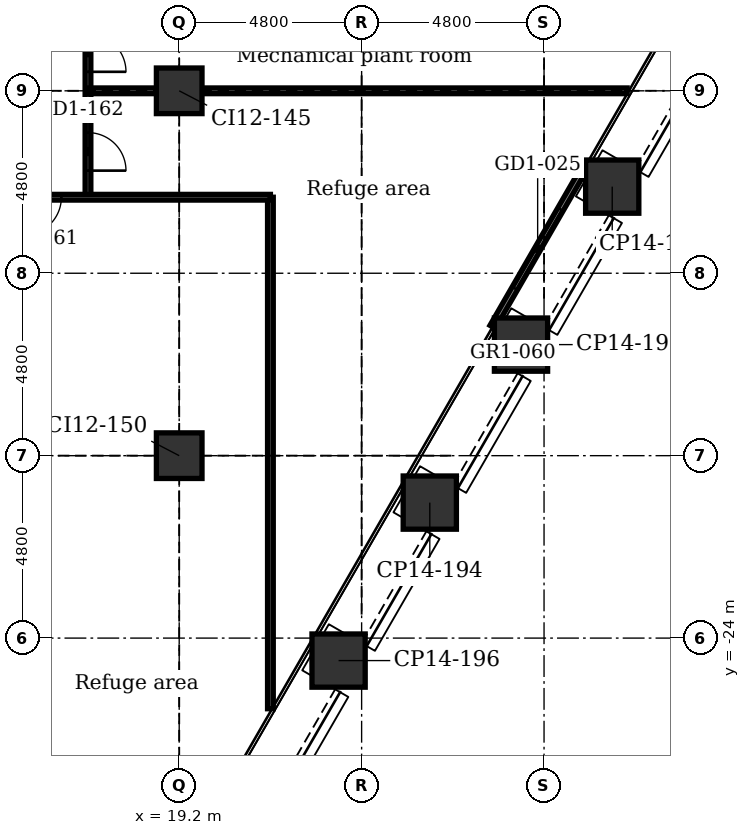
"""IFC4 building model, lengths in metres.
Left out: names, types, materials, properties, quantities, classifications, styles, units other than length and angle.
Written with IfcOpenShell. Run it as: python <this file> out.ifc"""

import sys

from ifc_helpers import new_model, si_unit, direction, frame, frame_2d, origin, origin_2d, place, context, subcontext, project, spatial, rectangle, extrude, element, fill, save


model = new_model("IFC4")
c1 = context("Model", 3, precision=1e-05, world=origin(), true_north=direction((0.0, 1.0)))
c2 = subcontext(c1, "Body", "Model", "MODEL_VIEW")
j1 = project(units=[si_unit("LENGTHUNIT", "METRE"), si_unit("PLANEANGLEUNIT", "RADIAN")], contexts=[c1])
p1 = place(None, origin())
s1 = spatial("IfcSite", under=j1, at=p1, CompositionType="ELEMENT")
p2 = place(p1, origin())
s2 = spatial("IfcBuilding", under=s1, at=p2, CompositionType="ELEMENT")
p3 = place(p2, frame((0.0, 0.0, 66.4)))
s3 = spatial("IfcBuildingStorey", under=s2, at=p3, CompositionType="ELEMENT", Elevation=66.4)
for number, where, z_axis, x_axis in (
    (1, (32.994, -7.964, -0.3), (0.0, 0.0, 1.0), (0.5, 0.866, 0.0)),
    (2, (30.594, -12.121, -0.3), (0.0, 0.0, 1.0), (0.5, 0.866, 0.0)),
    (3, (28.194, -16.278, -0.3), (0.0, 0.0, 1.0), (0.5, 0.866, 0.0)),
    (4, (25.794, -20.435, -0.3), (0.0, 0.0, 1.0), (0.5, 0.866, 0.0)),
    (5, (23.394, -24.592, -0.3), (0.0, 0.0, 1.0), (0.5, 0.866, 0.0)),
):
    element("IfcColumn", number, at=place(p3, frame(where, z_axis=z_axis, x_axis=x_axis)), inside=s3, PredefinedType="COLUMN", context=c2, shape_type="SweptSolid", body=[
        extrude(rectangle(XDim=1.4, YDim=1.4, at=origin_2d()), origin(), (0.0, 0.0, 1.0), 5.5),
    ])
for number, where, z_axis, x_axis in (
    (6, (19.2, -19.2, -0.3), (0.0, 0.0, 1.0), (1.0, 0.0, 0.0)),
    (7, (19.2, -9.6, -0.3), (0.0, 0.0, 1.0), (1.0, 0.0, 0.0)),
):
    element("IfcColumn", number, at=place(p3, frame(where, z_axis=z_axis, x_axis=x_axis)), inside=s3, PredefinedType="COLUMN", context=c2, shape_type="SweptSolid", body=[
        extrude(rectangle(XDim=1.2, YDim=1.2, at=origin_2d()), origin(), (0.0, 0.0, 1.0), 5.5),
    ])
p4 = place(p3, frame((29.817, -11.707, 0.0), z_axis=(0.0, 0.0, 1.0), x_axis=(-0.499978080042, -0.866038058908, 0.0)))
e8 = element("IfcWall", 8, at=p4, inside=s3, PredefinedType="PARTITIONING", context=c2, shape_type="SweptSolid", body=[
    extrude(rectangle(XDim=4.74, YDim=0.16, at=frame_2d((2.37, 0.0))), origin(), (0.0, 0.0, 1.0), 5.2),
])
p5 = place(p4, frame((1.17, 0.0, 0.0)))
e9 = element("IfcOpeningElement", 9, at=p5, cuts=e8, PredefinedType="OPENING", context=c2, shape_type="SweptSolid", body=[
    extrude(rectangle(XDim=2.4, YDim=2.4, at=frame_2d((1.2, 1.2))), frame((0.0, 0.09, 0.0), z_axis=(0.0, -1.0, 0.0), x_axis=(1.0, 0.0, 0.0)), (0.0, 0.0, 1.0), 0.18),
])
p6 = place(p3, frame((21.6, -25.858, 0.0), z_axis=(0.0, 0.0, 1.0), x_axis=(0.0, 1.0, 0.0)))
e10 = element("IfcWall", 10, at=p6, inside=s3, PredefinedType="PARTITIONING", context=c2, shape_type="SweptSolid", body=[
    extrude(rectangle(XDim=13.458, YDim=0.15, at=frame_2d((6.729, 0.0))), origin(), (0.0, 0.0, 1.0), 5.2),
])
p7 = place(p3, frame((16.8, -12.4, 0.0), z_axis=(0.0, 0.0, 1.0), x_axis=(0.0, 1.0, 0.0)))
e11 = element("IfcWall", 11, at=p7, inside=s3, PredefinedType="PARTITIONING", context=c2, shape_type="SweptSolid", body=[
    extrude(rectangle(XDim=8.45, YDim=0.15, at=frame_2d((4.225, 0.0))), origin(), (0.0, 0.0, 1.0), 5.2),
])
p8 = place(p7, frame((0.7, 0.0, 0.0)))
e12 = element("IfcOpeningElement", 12, at=p8, cuts=e11, PredefinedType="OPENING", context=c2, shape_type="SweptSolid", body=[
    extrude(rectangle(XDim=1.0, YDim=2.1, at=frame_2d((0.5, 1.05))), frame((0.0, 0.085, 0.0), z_axis=(0.0, -1.0, 0.0), x_axis=(1.0, 0.0, 0.0)), (0.0, 0.0, 1.0), 0.17),
])
p9 = place(p7, frame((3.3, 0.0, 0.0)))
e13 = element("IfcOpeningElement", 13, at=p9, cuts=e11, PredefinedType="OPENING", context=c2, shape_type="SweptSolid", body=[
    extrude(rectangle(XDim=1.0, YDim=2.1, at=frame_2d((0.5, 1.05))), frame((0.0, 0.085, 0.0), z_axis=(0.0, -1.0, 0.0), x_axis=(1.0, 0.0, 0.0)), (0.0, 0.0, 1.0), 0.17),
])
p10 = place(p7, frame((6.2, 0.0, 0.0)))
e14 = element("IfcOpeningElement", 14, at=p10, cuts=e11, PredefinedType="OPENING", context=c2, shape_type="SweptSolid", body=[
    extrude(rectangle(XDim=1.0, YDim=2.1, at=frame_2d((0.5, 1.05))), frame((0.0, 0.085, 0.0), z_axis=(0.0, -1.0, 0.0), x_axis=(1.0, 0.0, 0.0)), (0.0, 0.0, 1.0), 0.17),
])
p11 = place(p3, frame((-16.8, -12.4, 0.0), z_axis=(0.0, 0.0, 1.0), x_axis=(1.0, 0.0, 0.0)))
e15 = element("IfcWall", 15, at=p11, inside=s3, PredefinedType="PARTITIONING", context=c2, shape_type="SweptSolid", body=[
    extrude(rectangle(XDim=38.4, YDim=0.15, at=frame_2d((19.2, 0.0))), origin(), (0.0, 0.0, 1.0), 5.2),
])
p12 = place(p11, frame((0.7, 0.0, 0.0)))
e16 = element("IfcOpeningElement", 16, at=p12, cuts=e15, PredefinedType="OPENING", context=c2, shape_type="SweptSolid", body=[
    extrude(rectangle(XDim=1.0, YDim=2.1, at=frame_2d((0.5, 1.05))), frame((0.0, 0.085, 0.0), z_axis=(0.0, -1.0, 0.0), x_axis=(1.0, 0.0, 0.0)), (0.0, 0.0, 1.0), 0.17),
])
p13 = place(p11, frame((3.1, 0.0, 0.0)))
e17 = element("IfcOpeningElement", 17, at=p13, cuts=e15, PredefinedType="OPENING", context=c2, shape_type="SweptSolid", body=[
    extrude(rectangle(XDim=1.0, YDim=2.1, at=frame_2d((0.5, 1.05))), frame((0.0, 0.085, 0.0), z_axis=(0.0, -1.0, 0.0), x_axis=(1.0, 0.0, 0.0)), (0.0, 0.0, 1.0), 0.17),
])
p14 = place(p11, frame((5.5, 0.0, 0.0)))
e18 = element("IfcOpeningElement", 18, at=p14, cuts=e15, PredefinedType="OPENING", context=c2, shape_type="SweptSolid", body=[
    extrude(rectangle(XDim=1.0, YDim=2.1, at=frame_2d((0.5, 1.05))), frame((0.0, 0.085, 0.0), z_axis=(0.0, -1.0, 0.0), x_axis=(1.0, 0.0, 0.0)), (0.0, 0.0, 1.0), 0.17),
])
p15 = place(p11, frame((9.1, 0.0, 0.0)))
e19 = element("IfcOpeningElement", 19, at=p15, cuts=e15, PredefinedType="OPENING", context=c2, shape_type="SweptSolid", body=[
    extrude(rectangle(XDim=1.0, YDim=2.1, at=frame_2d((0.5, 1.05))), frame((0.0, 0.085, 0.0), z_axis=(0.0, -1.0, 0.0), x_axis=(1.0, 0.0, 0.0)), (0.0, 0.0, 1.0), 0.17),
])
p16 = place(p11, frame((13.9, 0.0, 0.0)))
e20 = element("IfcOpeningElement", 20, at=p16, cuts=e15, PredefinedType="OPENING", context=c2, shape_type="SweptSolid", body=[
    extrude(rectangle(XDim=1.0, YDim=2.1, at=frame_2d((0.5, 1.05))), frame((0.0, 0.085, 0.0), z_axis=(0.0, -1.0, 0.0), x_axis=(1.0, 0.0, 0.0)), (0.0, 0.0, 1.0), 0.17),
])
p17 = place(p11, frame((18.7, 0.0, 0.0)))
e21 = element("IfcOpeningElement", 21, at=p17, cuts=e15, PredefinedType="OPENING", context=c2, shape_type="SweptSolid", body=[
    extrude(rectangle(XDim=1.0, YDim=2.1, at=frame_2d((0.5, 1.05))), frame((0.0, 0.085, 0.0), z_axis=(0.0, -1.0, 0.0), x_axis=(1.0, 0.0, 0.0)), (0.0, 0.0, 1.0), 0.17),
])
p18 = place(p11, frame((23.5, 0.0, 0.0)))
e22 = element("IfcOpeningElement", 22, at=p18, cuts=e15, PredefinedType="OPENING", context=c2, shape_type="SweptSolid", body=[
    extrude(rectangle(XDim=1.0, YDim=2.1, at=frame_2d((0.5, 1.05))), frame((0.0, 0.085, 0.0), z_axis=(0.0, -1.0, 0.0), x_axis=(1.0, 0.0, 0.0)), (0.0, 0.0, 1.0), 0.17),
])
p19 = place(p11, frame((27.1, 0.0, 0.0)))
e23 = element("IfcOpeningElement", 23, at=p19, cuts=e15, PredefinedType="OPENING", context=c2, shape_type="SweptSolid", body=[
    extrude(rectangle(XDim=1.0, YDim=2.1, at=frame_2d((0.5, 1.05))), frame((0.0, 0.085, 0.0), z_axis=(0.0, -1.0, 0.0), x_axis=(1.0, 0.0, 0.0)), (0.0, 0.0, 1.0), 0.17),
])
p20 = place(p11, frame((29.5, 0.0, 0.0)))
e24 = element("IfcOpeningElement", 24, at=p20, cuts=e15, PredefinedType="OPENING", context=c2, shape_type="SweptSolid", body=[
    extrude(rectangle(XDim=1.0, YDim=2.1, at=frame_2d((0.5, 1.05))), frame((0.0, 0.085, 0.0), z_axis=(0.0, -1.0, 0.0), x_axis=(1.0, 0.0, 0.0)), (0.0, 0.0, 1.0), 0.17),
])
p21 = place(p11, frame((31.9, 0.0, 0.0)))
e25 = element("IfcOpeningElement", 25, at=p21, cuts=e15, PredefinedType="OPENING", context=c2, shape_type="SweptSolid", body=[
    extrude(rectangle(XDim=1.0, YDim=2.1, at=frame_2d((0.5, 1.05))), frame((0.0, 0.085, 0.0), z_axis=(0.0, -1.0, 0.0), x_axis=(1.0, 0.0, 0.0)), (0.0, 0.0, 1.0), 0.17),
])
p22 = place(p3, frame((16.8, -9.6, 0.0), z_axis=(0.0, 0.0, 1.0), x_axis=(1.0, 0.0, 0.0)))
e26 = element("IfcWall", 26, at=p22, inside=s3, PredefinedType="PARTITIONING", context=c2, shape_type="SweptSolid", body=[
    extrude(rectangle(XDim=1.8, YDim=0.15, at=frame_2d((0.9, 0.0))), origin(), (0.0, 0.0, 1.0), 4.592),
])
p23 = place(p3, frame((19.8, -9.6, 0.0), z_axis=(0.0, 0.0, 1.0), x_axis=(1.0, 0.0, 0.0)))
e27 = element("IfcWall", 27, at=p23, inside=s3, PredefinedType="PARTITIONING", context=c2, shape_type="SweptSolid", body=[
    extrude(rectangle(XDim=11.187, YDim=0.15, at=frame_2d((5.593, 0.0))), origin(), (0.0, 0.0, 1.0), 4.438),
])
p24 = place(p5, origin())
e28 = element("IfcDoor", 28, at=p24, inside=s3, OperationType="DOUBLE_DOOR_SLIDING", PredefinedType="DOOR", context=c2, shape_type="SweptSolid", body=[
    extrude(rectangle(XDim=2.4, YDim=2.4, at=frame_2d((1.2, 1.2))), frame((0.0, 0.025, 0.0), z_axis=(0.0, -1.0, 0.0), x_axis=(1.0, 0.0, 0.0)), (0.0, 0.0, 1.0), 0.05),
])
fill(e9, e28)
p25 = place(p21, frame((1.0, 0.0, 0.0), z_axis=(0.0, 0.0, 1.0), x_axis=(-1.0, 0.0, 0.0)))
e29 = element("IfcDoor", 29, at=p25, inside=s3, OperationType="SINGLE_SWING_LEFT", PredefinedType="DOOR", context=c2, shape_type="SweptSolid", body=[
    extrude(rectangle(XDim=1.0, YDim=2.1, at=frame_2d((0.5, 1.05))), frame((0.0, 0.025, 0.0), z_axis=(0.0, -1.0, 0.0), x_axis=(1.0, 0.0, 0.0)), (0.0, 0.0, 1.0), 0.05),
])
fill(e25, e29)
p26 = place(p8, frame((1.0, 0.0, 0.0), z_axis=(0.0, 0.0, 1.0), x_axis=(-1.0, 0.0, 0.0)))
e30 = element("IfcDoor", 30, at=p26, inside=s3, OperationType="SINGLE_SWING_LEFT", PredefinedType="DOOR", context=c2, shape_type="SweptSolid", body=[
    extrude(rectangle(XDim=1.0, YDim=2.1, at=frame_2d((0.5, 1.05))), frame((0.0, 0.025, 0.0), z_axis=(0.0, -1.0, 0.0), x_axis=(1.0, 0.0, 0.0)), (0.0, 0.0, 1.0), 0.05),
])
fill(e12, e30)
p27 = place(p9, frame((1.0, 0.0, 0.0), z_axis=(0.0, 0.0, 1.0), x_axis=(-1.0, 0.0, 0.0)))
e31 = element("IfcDoor", 31, at=p27, inside=s3, OperationType="SINGLE_SWING_LEFT", PredefinedType="DOOR", context=c2, shape_type="SweptSolid", body=[
    extrude(rectangle(XDim=1.0, YDim=2.1, at=frame_2d((0.5, 1.05))), frame((0.0, 0.025, 0.0), z_axis=(0.0, -1.0, 0.0), x_axis=(1.0, 0.0, 0.0)), (0.0, 0.0, 1.0), 0.05),
])
fill(e13, e31)
save(model, sys.argv[1])
